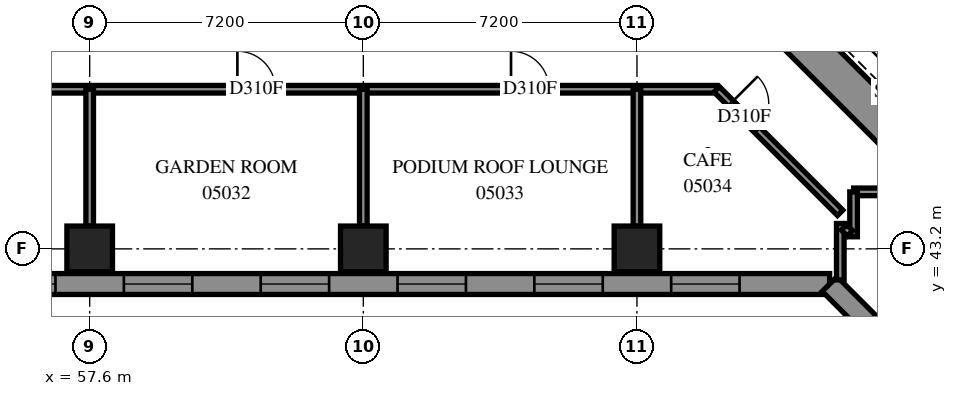
"""IFC4 building model, lengths in metres.
Left out: names, types, materials, properties, quantities, classifications, styles, units other than length and angle.
Written with IfcOpenShell. Run it as: python <this file> out.ifc"""

import sys

from ifc_helpers import new_model, si_unit, direction, frame, frame_2d, origin, origin_2d, place, context, subcontext, project, spatial, polyline, rectangle, outline, extrude, element, fill, save


model = new_model("IFC4")
c1 = context("Model", 3, precision=1e-05, world=origin(), true_north=direction((0.0, 1.0)))
c2 = subcontext(c1, "Body", "Model", "MODEL_VIEW")
j1 = project(units=[si_unit("LENGTHUNIT", "METRE"), si_unit("PLANEANGLEUNIT", "RADIAN")], contexts=[c1])
p1 = place(None, origin())
s1 = spatial("IfcSite", under=j1, at=p1, CompositionType="ELEMENT")
p2 = place(p1, origin())
s2 = spatial("IfcBuilding", under=s1, at=p2, CompositionType="ELEMENT")
p3 = place(p2, frame((0.0, 0.0, 22.8)))
s3 = spatial("IfcBuildingStorey", under=s2, at=p3, CompositionType="ELEMENT", Elevation=22.8)
for number, where, z_axis, x_axis in (
    (1, (57.6, 43.2, 0.0), (0.0, 0.0, 1.0), (1.0, 0.0, 0.0)),
    (2, (64.8, 43.2, 0.0), (0.0, 0.0, 1.0), (1.0, 0.0, 0.0)),
    (3, (72.0, 43.2, 0.0), (0.0, 0.0, 1.0), (1.0, 0.0, 0.0)),
):
    element("IfcColumn", number, at=place(p3, frame(where, z_axis=z_axis, x_axis=x_axis)), inside=s3, PredefinedType="COLUMN", context=c2, shape_type="SweptSolid", body=[
        extrude(rectangle(XDim=1.2, YDim=1.2, at=origin_2d()), origin(), (0.0, 0.0, 1.0), 3.9),
    ])
p4 = place(p3, frame((75.594, 49.443, -0.4), z_axis=(0.0, 0.0, 1.0), x_axis=(0.7071037324, -0.70710983, 0.0)))
e4 = element("IfcWall", 4, at=p4, inside=s3, PredefinedType="SHEAR", context=c2, shape_type="SweptSolid", body=[
    extrude(rectangle(XDim=16.4, YDim=1.0, at=frame_2d((8.2, 0.0))), origin(), (0.0, 0.0, 1.0), 3.6),
])
p5 = place(p3, frame((0.275, 42.275, 0.0), z_axis=(0.0, 0.0, 1.0), x_axis=(1.0, 0.0, 0.0)))
e5 = element("IfcWall", 5, at=p5, inside=s3, PredefinedType="SOLIDWALL", context=c2, shape_type="SweptSolid", body=[
    extrude(outline(polyline([(-0.275, -0.275), (76.681, -0.275), (76.909, 0.275), (0.275, 0.275), (-0.275, -0.275)])), origin(), (0.0, 0.0, 1.0), 3.9),
])
p6 = place(p5, frame((1.0, 0.0, 0.7)))
e6 = element("IfcOpeningElement", 6, at=p6, cuts=e5, PredefinedType="OPENING", context=c2, shape_type="SweptSolid", body=[
    extrude(rectangle(XDim=1.8, YDim=2.4, at=frame_2d((0.9, 1.2))), frame((0.0, 0.285, 0.0), z_axis=(0.0, -1.0, 0.0), x_axis=(1.0, 0.0, 0.0)), (0.0, 0.0, 1.0), 0.57),
])
p7 = place(p5, frame((3.825, 0.0, 0.7)))
e7 = element("IfcOpeningElement", 7, at=p7, cuts=e5, PredefinedType="OPENING", context=c2, shape_type="SweptSolid", body=[
    extrude(rectangle(XDim=1.8, YDim=2.4, at=frame_2d((0.9, 1.2))), frame((0.0, 0.285, 0.0), z_axis=(0.0, -1.0, 0.0), x_axis=(1.0, 0.0, 0.0)), (0.0, 0.0, 1.0), 0.57),
])
p8 = place(p5, frame((7.825, 0.0, 0.7)))
e8 = element("IfcOpeningElement", 8, at=p8, cuts=e5, PredefinedType="OPENING", context=c2, shape_type="SweptSolid", body=[
    extrude(rectangle(XDim=1.8, YDim=2.4, at=frame_2d((0.9, 1.2))), frame((0.0, 0.285, 0.0), z_axis=(0.0, -1.0, 0.0), x_axis=(1.0, 0.0, 0.0)), (0.0, 0.0, 1.0), 0.57),
])
p9 = place(p5, frame((11.425, 0.0, 0.7)))
e9 = element("IfcOpeningElement", 9, at=p9, cuts=e5, PredefinedType="OPENING", context=c2, shape_type="SweptSolid", body=[
    extrude(rectangle(XDim=1.8, YDim=2.4, at=frame_2d((0.9, 1.2))), frame((0.0, 0.285, 0.0), z_axis=(0.0, -1.0, 0.0), x_axis=(1.0, 0.0, 0.0)), (0.0, 0.0, 1.0), 0.57),
])
p10 = place(p5, frame((15.025, 0.0, 0.7)))
e10 = element("IfcOpeningElement", 10, at=p10, cuts=e5, PredefinedType="OPENING", context=c2, shape_type="SweptSolid", body=[
    extrude(rectangle(XDim=1.8, YDim=2.4, at=frame_2d((0.9, 1.2))), frame((0.0, 0.285, 0.0), z_axis=(0.0, -1.0, 0.0), x_axis=(1.0, 0.0, 0.0)), (0.0, 0.0, 1.0), 0.57),
])
p11 = place(p5, frame((18.625, 0.0, 0.7)))
e11 = element("IfcOpeningElement", 11, at=p11, cuts=e5, PredefinedType="OPENING", context=c2, shape_type="SweptSolid", body=[
    extrude(rectangle(XDim=1.8, YDim=2.4, at=frame_2d((0.9, 1.2))), frame((0.0, 0.285, 0.0), z_axis=(0.0, -1.0, 0.0), x_axis=(1.0, 0.0, 0.0)), (0.0, 0.0, 1.0), 0.57),
])
p12 = place(p5, frame((22.225, 0.0, 0.7)))
e12 = element("IfcOpeningElement", 12, at=p12, cuts=e5, PredefinedType="OPENING", context=c2, shape_type="SweptSolid", body=[
    extrude(rectangle(XDim=1.8, YDim=2.4, at=frame_2d((0.9, 1.2))), frame((0.0, 0.285, 0.0), z_axis=(0.0, -1.0, 0.0), x_axis=(1.0, 0.0, 0.0)), (0.0, 0.0, 1.0), 0.57),
])
p13 = place(p5, frame((25.825, 0.0, 0.7)))
e13 = element("IfcOpeningElement", 13, at=p13, cuts=e5, PredefinedType="OPENING", context=c2, shape_type="SweptSolid", body=[
    extrude(rectangle(XDim=1.8, YDim=2.4, at=frame_2d((0.9, 1.2))), frame((0.0, 0.285, 0.0), z_axis=(0.0, -1.0, 0.0), x_axis=(1.0, 0.0, 0.0)), (0.0, 0.0, 1.0), 0.57),
])
p14 = place(p5, frame((29.425, 0.0, 0.7)))
e14 = element("IfcOpeningElement", 14, at=p14, cuts=e5, PredefinedType="OPENING", context=c2, shape_type="SweptSolid", body=[
    extrude(rectangle(XDim=1.8, YDim=2.4, at=frame_2d((0.9, 1.2))), frame((0.0, 0.285, 0.0), z_axis=(0.0, -1.0, 0.0), x_axis=(1.0, 0.0, 0.0)), (0.0, 0.0, 1.0), 0.57),
])
p15 = place(p5, frame((33.025, 0.0, 0.7)))
e15 = element("IfcOpeningElement", 15, at=p15, cuts=e5, PredefinedType="OPENING", context=c2, shape_type="SweptSolid", body=[
    extrude(rectangle(XDim=1.8, YDim=2.4, at=frame_2d((0.9, 1.2))), frame((0.0, 0.285, 0.0), z_axis=(0.0, -1.0, 0.0), x_axis=(1.0, 0.0, 0.0)), (0.0, 0.0, 1.0), 0.57),
])
p16 = place(p5, frame((36.625, 0.0, 0.7)))
e16 = element("IfcOpeningElement", 16, at=p16, cuts=e5, PredefinedType="OPENING", context=c2, shape_type="SweptSolid", body=[
    extrude(rectangle(XDim=1.8, YDim=2.4, at=frame_2d((0.9, 1.2))), frame((0.0, 0.285, 0.0), z_axis=(0.0, -1.0, 0.0), x_axis=(1.0, 0.0, 0.0)), (0.0, 0.0, 1.0), 0.57),
])
p17 = place(p5, frame((40.225, 0.0, 0.7)))
e17 = element("IfcOpeningElement", 17, at=p17, cuts=e5, PredefinedType="OPENING", context=c2, shape_type="SweptSolid", body=[
    extrude(rectangle(XDim=1.8, YDim=2.4, at=frame_2d((0.9, 1.2))), frame((0.0, 0.285, 0.0), z_axis=(0.0, -1.0, 0.0), x_axis=(1.0, 0.0, 0.0)), (0.0, 0.0, 1.0), 0.57),
])
p18 = place(p5, frame((43.825, 0.0, 0.7)))
e18 = element("IfcOpeningElement", 18, at=p18, cuts=e5, PredefinedType="OPENING", context=c2, shape_type="SweptSolid", body=[
    extrude(rectangle(XDim=1.8, YDim=2.4, at=frame_2d((0.9, 1.2))), frame((0.0, 0.285, 0.0), z_axis=(0.0, -1.0, 0.0), x_axis=(1.0, 0.0, 0.0)), (0.0, 0.0, 1.0), 0.57),
])
p19 = place(p5, frame((47.425, 0.0, 0.7)))
e19 = element("IfcOpeningElement", 19, at=p19, cuts=e5, PredefinedType="OPENING", context=c2, shape_type="SweptSolid", body=[
    extrude(rectangle(XDim=1.8, YDim=2.4, at=frame_2d((0.9, 1.2))), frame((0.0, 0.285, 0.0), z_axis=(0.0, -1.0, 0.0), x_axis=(1.0, 0.0, 0.0)), (0.0, 0.0, 1.0), 0.57),
])
p20 = place(p5, frame((51.025, 0.0, 0.7)))
e20 = element("IfcOpeningElement", 20, at=p20, cuts=e5, PredefinedType="OPENING", context=c2, shape_type="SweptSolid", body=[
    extrude(rectangle(XDim=1.8, YDim=2.4, at=frame_2d((0.9, 1.2))), frame((0.0, 0.285, 0.0), z_axis=(0.0, -1.0, 0.0), x_axis=(1.0, 0.0, 0.0)), (0.0, 0.0, 1.0), 0.57),
])
p21 = place(p5, frame((54.625, 0.0, 0.7)))
e21 = element("IfcOpeningElement", 21, at=p21, cuts=e5, PredefinedType="OPENING", context=c2, shape_type="SweptSolid", body=[
    extrude(rectangle(XDim=1.8, YDim=2.4, at=frame_2d((0.9, 1.2))), frame((0.0, 0.285, 0.0), z_axis=(0.0, -1.0, 0.0), x_axis=(1.0, 0.0, 0.0)), (0.0, 0.0, 1.0), 0.57),
])
p22 = place(p5, frame((58.225, 0.0, 0.7)))
e22 = element("IfcOpeningElement", 22, at=p22, cuts=e5, PredefinedType="OPENING", context=c2, shape_type="SweptSolid", body=[
    extrude(rectangle(XDim=1.8, YDim=2.4, at=frame_2d((0.9, 1.2))), frame((0.0, 0.285, 0.0), z_axis=(0.0, -1.0, 0.0), x_axis=(1.0, 0.0, 0.0)), (0.0, 0.0, 1.0), 0.57),
])
p23 = place(p5, frame((61.825, 0.0, 0.7)))
e23 = element("IfcOpeningElement", 23, at=p23, cuts=e5, PredefinedType="OPENING", context=c2, shape_type="SweptSolid", body=[
    extrude(rectangle(XDim=1.8, YDim=2.4, at=frame_2d((0.9, 1.2))), frame((0.0, 0.285, 0.0), z_axis=(0.0, -1.0, 0.0), x_axis=(1.0, 0.0, 0.0)), (0.0, 0.0, 1.0), 0.57),
])
p24 = place(p5, frame((65.425, 0.0, 0.7)))
e24 = element("IfcOpeningElement", 24, at=p24, cuts=e5, PredefinedType="OPENING", context=c2, shape_type="SweptSolid", body=[
    extrude(rectangle(XDim=1.8, YDim=2.4, at=frame_2d((0.9, 1.2))), frame((0.0, 0.285, 0.0), z_axis=(0.0, -1.0, 0.0), x_axis=(1.0, 0.0, 0.0)), (0.0, 0.0, 1.0), 0.57),
])
p25 = place(p5, frame((69.025, 0.0, 0.7)))
e25 = element("IfcOpeningElement", 25, at=p25, cuts=e5, PredefinedType="OPENING", context=c2, shape_type="SweptSolid", body=[
    extrude(rectangle(XDim=1.8, YDim=2.4, at=frame_2d((0.9, 1.2))), frame((0.0, 0.285, 0.0), z_axis=(0.0, -1.0, 0.0), x_axis=(1.0, 0.0, 0.0)), (0.0, 0.0, 1.0), 0.57),
])
p26 = place(p5, frame((72.625, 0.0, 0.7)))
e26 = element("IfcOpeningElement", 26, at=p26, cuts=e5, PredefinedType="OPENING", context=c2, shape_type="SweptSolid", body=[
    extrude(rectangle(XDim=1.8, YDim=2.4, at=frame_2d((0.9, 1.2))), frame((0.0, 0.285, 0.0), z_axis=(0.0, -1.0, 0.0), x_axis=(1.0, 0.0, 0.0)), (0.0, 0.0, 1.0), 0.57),
])
p27 = place(p3, frame((77.07, 42.275, 0.0), z_axis=(0.0, 0.0, 1.0), x_axis=(0.7071067812, -0.7071067812, 0.0)))
e27 = element("IfcWall", 27, at=p27, inside=s3, PredefinedType="SOLIDWALL", context=c2, shape_type="SweptSolid", body=[
    extrude(outline(polyline([(0.114, -0.275), (39.288, -0.275), (38.737, 0.275), (-0.114, 0.275), (0.114, -0.275)])), origin(), (0.0, 0.0, 1.0), 3.9),
])
p28 = place(p27, frame((2.837, 0.0, 0.7)))
e28 = element("IfcOpeningElement", 28, at=p28, cuts=e27, PredefinedType="OPENING", context=c2, shape_type="SweptSolid", body=[
    extrude(rectangle(XDim=1.8, YDim=2.4, at=frame_2d((0.9, 1.2))), frame((0.0, 0.285, 0.0), z_axis=(0.0, -1.0, 0.0), x_axis=(1.0, 0.0, 0.0)), (0.0, 0.0, 1.0), 0.57),
])
p29 = place(p27, frame((6.588, 0.0, 0.7)))
e29 = element("IfcOpeningElement", 29, at=p29, cuts=e27, PredefinedType="OPENING", context=c2, shape_type="SweptSolid", body=[
    extrude(rectangle(XDim=1.8, YDim=2.4, at=frame_2d((0.9, 1.2))), frame((0.0, 0.285, 0.0), z_axis=(0.0, -1.0, 0.0), x_axis=(1.0, 0.0, 0.0)), (0.0, 0.0, 1.0), 0.57),
])
p30 = place(p27, frame((10.188, 0.0, 0.7)))
e30 = element("IfcOpeningElement", 30, at=p30, cuts=e27, PredefinedType="OPENING", context=c2, shape_type="SweptSolid", body=[
    extrude(rectangle(XDim=1.8, YDim=2.4, at=frame_2d((0.9, 1.2))), frame((0.0, 0.285, 0.0), z_axis=(0.0, -1.0, 0.0), x_axis=(1.0, 0.0, 0.0)), (0.0, 0.0, 1.0), 0.57),
])
p31 = place(p27, frame((13.787, 0.0, 0.7)))
e31 = element("IfcOpeningElement", 31, at=p31, cuts=e27, PredefinedType="OPENING", context=c2, shape_type="SweptSolid", body=[
    extrude(rectangle(XDim=1.8, YDim=2.4, at=frame_2d((0.9, 1.2))), frame((0.0, 0.285, 0.0), z_axis=(0.0, -1.0, 0.0), x_axis=(1.0, 0.0, 0.0)), (0.0, 0.0, 1.0), 0.57),
])
p32 = place(p27, frame((17.387, 0.0, 0.7)))
e32 = element("IfcOpeningElement", 32, at=p32, cuts=e27, PredefinedType="OPENING", context=c2, shape_type="SweptSolid", body=[
    extrude(rectangle(XDim=1.8, YDim=2.4, at=frame_2d((0.9, 1.2))), frame((0.0, 0.285, 0.0), z_axis=(0.0, -1.0, 0.0), x_axis=(1.0, 0.0, 0.0)), (0.0, 0.0, 1.0), 0.57),
])
p33 = place(p27, frame((20.988, 0.0, 0.7)))
e33 = element("IfcOpeningElement", 33, at=p33, cuts=e27, PredefinedType="OPENING", context=c2, shape_type="SweptSolid", body=[
    extrude(rectangle(XDim=1.8, YDim=2.4, at=frame_2d((0.9, 1.2))), frame((0.0, 0.285, 0.0), z_axis=(0.0, -1.0, 0.0), x_axis=(1.0, 0.0, 0.0)), (0.0, 0.0, 1.0), 0.57),
])
p34 = place(p27, frame((24.587, 0.0, 0.7)))
e34 = element("IfcOpeningElement", 34, at=p34, cuts=e27, PredefinedType="OPENING", context=c2, shape_type="SweptSolid", body=[
    extrude(rectangle(XDim=1.8, YDim=2.4, at=frame_2d((0.9, 1.2))), frame((0.0, 0.285, 0.0), z_axis=(0.0, -1.0, 0.0), x_axis=(1.0, 0.0, 0.0)), (0.0, 0.0, 1.0), 0.57),
])
p35 = place(p27, frame((28.188, 0.0, 0.7)))
e35 = element("IfcOpeningElement", 35, at=p35, cuts=e27, PredefinedType="OPENING", context=c2, shape_type="SweptSolid", body=[
    extrude(rectangle(XDim=1.8, YDim=2.4, at=frame_2d((0.9, 1.2))), frame((0.0, 0.285, 0.0), z_axis=(0.0, -1.0, 0.0), x_axis=(1.0, 0.0, 0.0)), (0.0, 0.0, 1.0), 0.57),
])
p36 = place(p27, frame((31.788, 0.0, 0.7)))
e36 = element("IfcOpeningElement", 36, at=p36, cuts=e27, PredefinedType="OPENING", context=c2, shape_type="SweptSolid", body=[
    extrude(rectangle(XDim=1.8, YDim=2.4, at=frame_2d((0.9, 1.2))), frame((0.0, 0.285, 0.0), z_axis=(0.0, -1.0, 0.0), x_axis=(1.0, 0.0, 0.0)), (0.0, 0.0, 1.0), 0.57),
])
p37 = place(p27, frame((35.388, 0.0, 0.7)))
e37 = element("IfcOpeningElement", 37, at=p37, cuts=e27, PredefinedType="OPENING", context=c2, shape_type="SweptSolid", body=[
    extrude(rectangle(XDim=1.8, YDim=2.4, at=frame_2d((0.9, 1.2))), frame((0.0, 0.285, 0.0), z_axis=(0.0, -1.0, 0.0), x_axis=(1.0, 0.0, 0.0)), (0.0, 0.0, 1.0), 0.57),
])
p38 = place(p3, frame((54.6, 47.4, 0.0), z_axis=(0.0, 0.0, 1.0), x_axis=(1.0, 0.0, 0.0)))
e38 = element("IfcWall", 38, at=p38, inside=s3, PredefinedType="PARTITIONING", context=c2, shape_type="SweptSolid", body=[
    extrude(rectangle(XDim=19.502, YDim=0.2, at=frame_2d((9.751, 0.0))), origin(), (0.0, 0.0, 1.0), 3.9),
])
p39 = place(p38, frame((6.886, 0.0, 0.0)))
e39 = element("IfcOpeningElement", 39, at=p39, cuts=e38, PredefinedType="OPENING", context=c2, shape_type="SweptSolid", body=[
    extrude(rectangle(XDim=1.0, YDim=2.1, at=frame_2d((0.5, 1.05))), frame((0.0, 0.11, 0.0), z_axis=(0.0, -1.0, 0.0), x_axis=(1.0, 0.0, 0.0)), (0.0, 0.0, 1.0), 0.22),
])
p40 = place(p38, frame((14.086, 0.0, 0.0)))
e40 = element("IfcOpeningElement", 40, at=p40, cuts=e38, PredefinedType="OPENING", context=c2, shape_type="SweptSolid", body=[
    extrude(rectangle(XDim=1.0, YDim=2.1, at=frame_2d((0.5, 1.05))), frame((0.0, 0.11, 0.0), z_axis=(0.0, -1.0, 0.0), x_axis=(1.0, 0.0, 0.0)), (0.0, 0.0, 1.0), 0.22),
])
p41 = place(p3, frame((74.099, 47.397, 0.0), z_axis=(0.0, 0.0, 1.0), x_axis=(0.7071067812, -0.7071067812, 0.0)))
e41 = element("IfcWall", 41, at=p41, inside=s3, PredefinedType="PARTITIONING", context=c2, shape_type="SweptSolid", body=[
    extrude(rectangle(XDim=4.593, YDim=0.2, at=frame_2d((2.297, 0.0))), origin(), (0.0, 0.0, 1.0), 3.9),
])
p42 = place(p41, frame((0.521, 0.0, 0.0)))
e42 = element("IfcOpeningElement", 42, at=p42, cuts=e41, PredefinedType="OPENING", context=c2, shape_type="SweptSolid", body=[
    extrude(rectangle(XDim=1.0, YDim=2.1, at=frame_2d((0.5, 1.05))), frame((0.0, 0.11, 0.0), z_axis=(0.0, -1.0, 0.0), x_axis=(1.0, 0.0, 0.0)), (0.0, 0.0, 1.0), 0.22),
])
for number, where, z_axis, x_axis in (
    (43, (57.6, 43.8, 0.0), (0.0, 0.0, 1.0), (0.0, 1.0, 0.0)),
    (44, (64.8, 43.8, 0.0), (0.0, 0.0, 1.0), (0.0, 1.0, 0.0)),
    (45, (72.0, 43.8, 0.0), (0.0, 0.0, 1.0), (0.0, 1.0, 0.0)),
):
    element("IfcWall", number, at=place(p3, frame(where, z_axis=z_axis, x_axis=x_axis)), inside=s3, PredefinedType="PARTITIONING", context=c2, shape_type="SweptSolid", body=[
        extrude(rectangle(XDim=3.6, YDim=0.2, at=frame_2d((1.8, 0.0))), origin(), (0.0, 0.0, 1.0), 3.9),
    ])
p43 = place(p3, frame((77.702, 44.7, 0.0), z_axis=(0.0, 0.0, 1.0), x_axis=(1.0, 0.0, 0.0)))
e46 = element("IfcWall", 46, at=p43, inside=s3, PredefinedType="PARTITIONING", context=c2, shape_type="SweptSolid", body=[
    extrude(rectangle(XDim=1.814, YDim=0.2, at=frame_2d((0.907, 0.0))), origin(), (0.0, 0.0, 1.0), 3.9),
])
p44 = place(p3, frame((77.35, 42.384, 0.0), z_axis=(0.0, 0.0, 1.0), x_axis=(0.0, 1.0, 0.0)))
e47 = element("IfcWall", 47, at=p44, inside=s3, PredefinedType="PARTITIONING", context=c2, shape_type="SweptSolid", body=[
    extrude(rectangle(XDim=1.484, YDim=0.2, at=frame_2d((0.742, 0.0))), origin(), (0.0, 0.0, 1.0), 3.9),
])
p45 = place(p3, frame((77.7, 43.518, 0.0), z_axis=(0.0, 0.0, 1.0), x_axis=(0.0, 1.0, 0.0)))
e48 = element("IfcWall", 48, at=p45, inside=s3, PredefinedType="PARTITIONING", context=c2, shape_type="SweptSolid", body=[
    extrude(rectangle(XDim=1.182, YDim=0.2, at=frame_2d((0.591, 0.0))), origin(), (0.0, 0.0, 1.0), 3.9),
])
p46 = place(p3, frame((77.446, 43.766, 0.0), z_axis=(0.0, 0.0, 1.0), x_axis=(0.7071067812, -0.7071067812, 0.0)))
e49 = element("IfcWall", 49, at=p46, inside=s3, PredefinedType="PARTITIONING", context=c2, shape_type="SweptSolid", body=[
    extrude(rectangle(XDim=0.225, YDim=0.2, at=frame_2d((0.113, 0.0))), origin(), (0.0, 0.0, 1.0), 3.9),
])
p47 = place(p21, origin())
e50 = element("IfcWindow", 50, at=p47, inside=s3, PartitioningType="SINGLE_PANEL", PredefinedType="WINDOW", context=c2, shape_type="SweptSolid", body=[
    extrude(rectangle(XDim=1.8, YDim=2.4, at=frame_2d((0.9, 1.2))), frame((0.0, 0.155, 0.0), z_axis=(0.0, -1.0, 0.0), x_axis=(1.0, 0.0, 0.0)), (0.0, 0.0, 1.0), 0.06),
])
fill(e21, e50)
p48 = place(p22, origin())
e51 = element("IfcWindow", 51, at=p48, inside=s3, PartitioningType="SINGLE_PANEL", PredefinedType="WINDOW", context=c2, shape_type="SweptSolid", body=[
    extrude(rectangle(XDim=1.8, YDim=2.4, at=frame_2d((0.9, 1.2))), frame((0.0, 0.155, 0.0), z_axis=(0.0, -1.0, 0.0), x_axis=(1.0, 0.0, 0.0)), (0.0, 0.0, 1.0), 0.06),
])
fill(e22, e51)
p49 = place(p23, origin())
e52 = element("IfcWindow", 52, at=p49, inside=s3, PartitioningType="SINGLE_PANEL", PredefinedType="WINDOW", context=c2, shape_type="SweptSolid", body=[
    extrude(rectangle(XDim=1.8, YDim=2.4, at=frame_2d((0.9, 1.2))), frame((0.0, 0.155, 0.0), z_axis=(0.0, -1.0, 0.0), x_axis=(1.0, 0.0, 0.0)), (0.0, 0.0, 1.0), 0.06),
])
fill(e23, e52)
p50 = place(p24, origin())
e53 = element("IfcWindow", 53, at=p50, inside=s3, PartitioningType="SINGLE_PANEL", PredefinedType="WINDOW", context=c2, shape_type="SweptSolid", body=[
    extrude(rectangle(XDim=1.8, YDim=2.4, at=frame_2d((0.9, 1.2))), frame((0.0, 0.155, 0.0), z_axis=(0.0, -1.0, 0.0), x_axis=(1.0, 0.0, 0.0)), (0.0, 0.0, 1.0), 0.06),
])
fill(e24, e53)
p51 = place(p25, origin())
e54 = element("IfcWindow", 54, at=p51, inside=s3, PartitioningType="SINGLE_PANEL", PredefinedType="WINDOW", context=c2, shape_type="SweptSolid", body=[
    extrude(rectangle(XDim=1.8, YDim=2.4, at=frame_2d((0.9, 1.2))), frame((0.0, 0.155, 0.0), z_axis=(0.0, -1.0, 0.0), x_axis=(1.0, 0.0, 0.0)), (0.0, 0.0, 1.0), 0.06),
])
fill(e25, e54)
p52 = place(p26, origin())
e55 = element("IfcWindow", 55, at=p52, inside=s3, PartitioningType="SINGLE_PANEL", PredefinedType="WINDOW", context=c2, shape_type="SweptSolid", body=[
    extrude(rectangle(XDim=1.8, YDim=2.4, at=frame_2d((0.9, 1.2))), frame((0.0, 0.155, 0.0), z_axis=(0.0, -1.0, 0.0), x_axis=(1.0, 0.0, 0.0)), (0.0, 0.0, 1.0), 0.06),
])
fill(e26, e55)
p53 = place(p39, origin())
e56 = element("IfcDoor", 56, at=p53, inside=s3, OperationType="SINGLE_SWING_LEFT", PredefinedType="DOOR", context=c2, shape_type="SweptSolid", body=[
    extrude(rectangle(XDim=1.0, YDim=2.1, at=frame_2d((0.5, 1.05))), frame((0.0, 0.025, 0.0), z_axis=(0.0, -1.0, 0.0), x_axis=(1.0, 0.0, 0.0)), (0.0, 0.0, 1.0), 0.05),
])
fill(e39, e56)
p54 = place(p40, origin())
e57 = element("IfcDoor", 57, at=p54, inside=s3, OperationType="SINGLE_SWING_LEFT", PredefinedType="DOOR", context=c2, shape_type="SweptSolid", body=[
    extrude(rectangle(XDim=1.0, YDim=2.1, at=frame_2d((0.5, 1.05))), frame((0.0, 0.025, 0.0), z_axis=(0.0, -1.0, 0.0), x_axis=(1.0, 0.0, 0.0)), (0.0, 0.0, 1.0), 0.05),
])
fill(e40, e57)
p55 = place(p42, origin())
e58 = element("IfcDoor", 58, at=p55, inside=s3, OperationType="SINGLE_SWING_LEFT", PredefinedType="DOOR", context=c2, shape_type="SweptSolid", body=[
    extrude(rectangle(XDim=1.0, YDim=2.1, at=frame_2d((0.5, 1.05))), frame((0.0, 0.025, 0.0), z_axis=(0.0, -1.0, 0.0), x_axis=(1.0, 0.0, 0.0)), (0.0, 0.0, 1.0), 0.05),
])
fill(e42, e58)
save(model, sys.argv[1])
